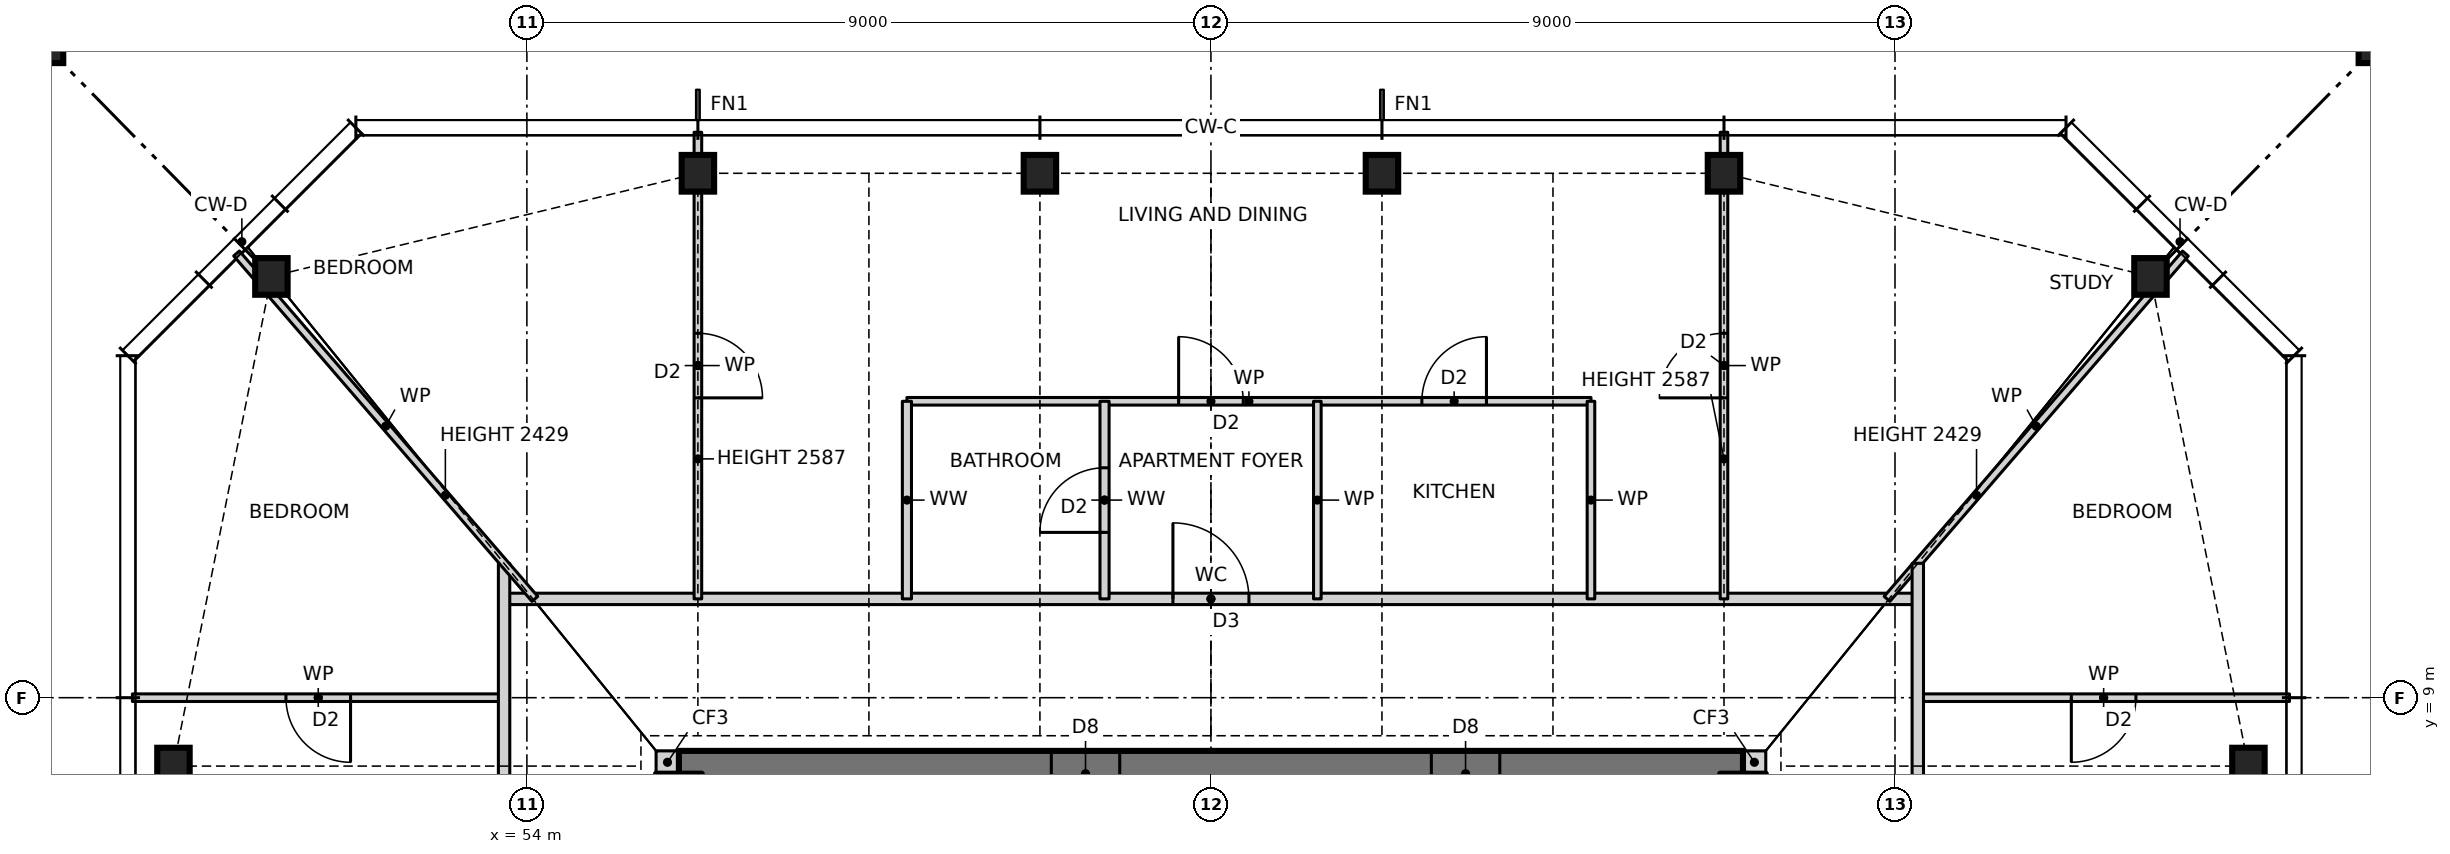
"""IFC4 building model, lengths in metres.
Left out: names, types, materials, properties, quantities, classifications, styles, units other than length and angle.
Written with IfcOpenShell. Run it as: python <this file> out.ifc"""

import sys

from ifc_helpers import new_model, si_unit, direction, frame, frame_2d, origin, origin_2d, place, context, subcontext, project, spatial, rectangle, hollow_rectangle, i_section, extrude, element, fill, save


model = new_model("IFC4")
c1 = context("Model", 3, precision=1e-05, world=origin(), true_north=direction((0.0, 1.0)))
c2 = subcontext(c1, "Body", "Model", "MODEL_VIEW")
j1 = project(units=[si_unit("LENGTHUNIT", "METRE"), si_unit("PLANEANGLEUNIT", "RADIAN")], contexts=[c1])
p1 = place(None, origin())
s1 = spatial("IfcSite", under=j1, at=p1, CompositionType="ELEMENT")
p2 = place(p1, origin())
s2 = spatial("IfcBuilding", under=s1, at=p2, CompositionType="ELEMENT")
p3 = place(p2, frame((0.0, 0.0, 115.5)))
s3 = spatial("IfcBuildingStorey", under=s2, at=p3, CompositionType="ELEMENT", Elevation=115.5)
for number, where, z_axis, x_axis in (
    (1, (76.65, 8.1, 0.0), (0.0, 0.0, 1.0), (1.0, 0.0, 0.0)),
    (2, (75.361, 14.543, 0.0), (0.0, 0.0, 1.0), (1.0, 0.0, 0.0)),
    (3, (69.75, 15.9, 0.0), (0.0, 0.0, 1.0), (1.0, 0.0, 0.0)),
    (4, (65.25, 15.9, 0.0), (0.0, 0.0, 1.0), (1.0, 0.0, 0.0)),
    (5, (60.75, 15.9, 0.0), (0.0, 0.0, 1.0), (1.0, 0.0, 0.0)),
    (6, (56.25, 15.9, 0.0), (0.0, 0.0, 1.0), (1.0, 0.0, 0.0)),
    (7, (50.639, 14.543, 0.0), (0.0, 0.0, 1.0), (1.0, 0.0, 0.0)),
    (8, (49.35, 8.1, 0.0), (0.0, 0.0, 1.0), (1.0, 0.0, 0.0)),
):
    element("IfcColumn", number, at=place(p3, frame(where, z_axis=z_axis, x_axis=x_axis)), inside=s3, PredefinedType="COLUMN", context=c2, shape_type="SweptSolid", body=[
        extrude(i_section(OverallWidth=0.427, OverallDepth=0.483, WebThickness=0.051, FlangeThickness=0.082, at=origin_2d()), origin(), (0.0, 0.0, 1.0), 3.5),
    ])
for number, where, z_axis, x_axis in (
    (9, (78.65, 17.9, 0.0), (0.0, 0.0, 1.0), (1.0, 0.0, 0.0)),
    (10, (47.35, 17.9, 0.0), (0.0, 0.0, 1.0), (1.0, 0.0, 0.0)),
):
    element("IfcColumn", number, at=place(p3, frame(where, z_axis=z_axis, x_axis=x_axis)), inside=s3, PredefinedType="COLUMN", context=c2, shape_type="SweptSolid", body=[
        extrude(hollow_rectangle(XDim=1.1, YDim=1.1, WallThickness=0.06, at=origin_2d()), origin(), (0.0, 0.0, 1.0), 3.5),
    ])
for number, where, z_axis, x_axis in (
    (11, (70.0, 8.15, 0.0), (0.0, 0.0, 1.0), (1.0, 0.0, 0.0)),
    (12, (55.7, 8.15, 0.0), (0.0, 0.0, 1.0), (1.0, 0.0, 0.0)),
):
    element("IfcWall", number, at=place(p3, frame(where, z_axis=z_axis, x_axis=x_axis)), inside=s3, PredefinedType="SOLIDWALL", context=c2, shape_type="SweptSolid", body=[
        extrude(rectangle(XDim=0.3, YDim=0.3, at=frame_2d((0.15, 0.0))), origin(), (0.0, 0.0, 1.0), 3.5),
    ])
p4 = place(p3, frame((70.0, 8.0, 0.0), z_axis=(0.0, 0.0, 1.0), x_axis=(-1.0, 0.0, 0.0)))
e13 = element("IfcWall", 13, at=p4, inside=s3, PredefinedType="SHEAR", context=c2, shape_type="SweptSolid", body=[
    extrude(rectangle(XDim=14.0, YDim=0.6, at=frame_2d((7.0, 0.0))), origin(), (0.0, 0.0, 1.0), 3.5),
])
p5 = place(p4, frame((8.2, 0.0, 0.0)))
e14 = element("IfcOpeningElement", 14, at=p5, cuts=e13, PredefinedType="OPENING", context=c2, shape_type="SweptSolid", body=[
    extrude(rectangle(XDim=0.9, YDim=2.1, at=frame_2d((0.45, 1.05))), frame((0.0, 0.31, 0.0), z_axis=(0.0, -1.0, 0.0), x_axis=(1.0, 0.0, 0.0)), (0.0, 0.0, 1.0), 0.62),
])
p6 = place(p4, frame((3.2, 0.0, 0.0)))
e15 = element("IfcOpeningElement", 15, at=p6, cuts=e13, PredefinedType="OPENING", context=c2, shape_type="SweptSolid", body=[
    extrude(rectangle(XDim=0.9, YDim=2.1, at=frame_2d((0.45, 1.05))), frame((0.0, 0.31, 0.0), z_axis=(0.0, -1.0, 0.0), x_axis=(1.0, 0.0, 0.0)), (0.0, 0.0, 1.0), 0.62),
])
p7 = place(p3, frame((48.81, 9.0, 0.0), z_axis=(0.0, 0.0, 1.0), x_axis=(1.0, 0.0, 0.0)))
e16 = element("IfcWall", 16, at=p7, inside=s3, PredefinedType="PARTITIONING", context=c2, shape_type="SweptSolid", body=[
    extrude(rectangle(XDim=4.89, YDim=0.1, at=frame_2d((2.445, 0.0))), origin(), (0.0, 0.0, 1.0), 3.27),
])
p8 = place(p7, frame((2.02, 0.0, 0.0)))
e17 = element("IfcOpeningElement", 17, at=p8, cuts=e16, PredefinedType="OPENING", context=c2, shape_type="SweptSolid", body=[
    extrude(rectangle(XDim=0.85, YDim=2.1, at=frame_2d((0.425, 1.05))), frame((0.0, 0.06, 0.0), z_axis=(0.0, -1.0, 0.0), x_axis=(1.0, 0.0, 0.0)), (0.0, 0.0, 1.0), 0.12),
])
p9 = place(p3, frame((72.3, 9.0, 0.0), z_axis=(0.0, 0.0, 1.0), x_axis=(1.0, 0.0, 0.0)))
e18 = element("IfcWall", 18, at=p9, inside=s3, PredefinedType="PARTITIONING", context=c2, shape_type="SweptSolid", body=[
    extrude(rectangle(XDim=4.89, YDim=0.1, at=frame_2d((2.445, 0.0))), origin(), (0.0, 0.0, 1.0), 3.27),
])
p10 = place(p9, frame((2.02, 0.0, 0.0)))
e19 = element("IfcOpeningElement", 19, at=p10, cuts=e18, PredefinedType="OPENING", context=c2, shape_type="SweptSolid", body=[
    extrude(rectangle(XDim=0.85, YDim=2.1, at=frame_2d((0.425, 1.05))), frame((0.0, 0.06, 0.0), z_axis=(0.0, -1.0, 0.0), x_axis=(1.0, 0.0, 0.0)), (0.0, 0.0, 1.0), 0.12),
])
p11 = place(p3, frame((53.7, 10.3, 0.0), z_axis=(0.0, 0.0, 1.0), x_axis=(1.0, 0.0, 0.0)))
e20 = element("IfcWall", 20, at=p11, inside=s3, PredefinedType="PARTITIONING", context=c2, shape_type="SweptSolid", body=[
    extrude(rectangle(XDim=18.6, YDim=0.15, at=frame_2d((9.3, 0.0))), origin(), (0.0, 0.0, 1.0), 3.27),
])
p12 = place(p11, frame((8.8, 0.0, 0.0)))
e21 = element("IfcOpeningElement", 21, at=p12, cuts=e20, PredefinedType="OPENING", context=c2, shape_type="SweptSolid", body=[
    extrude(rectangle(XDim=1.0, YDim=2.1, at=frame_2d((0.5, 1.05))), frame((0.0, 0.085, 0.0), z_axis=(0.0, -1.0, 0.0), x_axis=(1.0, 0.0, 0.0)), (0.0, 0.0, 1.0), 0.17),
])
p13 = place(p3, frame((59.0, 12.9, 0.0), z_axis=(0.0, 0.0, 1.0), x_axis=(1.0, 0.0, 0.0)))
e22 = element("IfcWall", 22, at=p13, inside=s3, PredefinedType="PARTITIONING", context=c2, shape_type="SweptSolid", body=[
    extrude(rectangle(XDim=9.0, YDim=0.1, at=frame_2d((4.5, 0.0))), origin(), (0.0, 0.0, 1.0), 3.27),
])
p14 = place(p13, frame((6.775, 0.0, 0.0)))
e23 = element("IfcOpeningElement", 23, at=p14, cuts=e22, PredefinedType="OPENING", context=c2, shape_type="SweptSolid", body=[
    extrude(rectangle(XDim=0.85, YDim=2.1, at=frame_2d((0.425, 1.05))), frame((0.0, 0.06, 0.0), z_axis=(0.0, -1.0, 0.0), x_axis=(1.0, 0.0, 0.0)), (0.0, 0.0, 1.0), 0.12),
])
p15 = place(p13, frame((3.575, 0.0, 0.0)))
e24 = element("IfcOpeningElement", 24, at=p15, cuts=e22, PredefinedType="OPENING", context=c2, shape_type="SweptSolid", body=[
    extrude(rectangle(XDim=0.85, YDim=2.1, at=frame_2d((0.425, 1.05))), frame((0.0, 0.06, 0.0), z_axis=(0.0, -1.0, 0.0), x_axis=(1.0, 0.0, 0.0)), (0.0, 0.0, 1.0), 0.12),
])
p16 = place(p3, frame((71.895, 10.3, 0.0), z_axis=(0.0, 0.0, 1.0), x_axis=(0.65378286253, 0.756682211144, 0.0)))
e25 = element("IfcWall", 25, at=p16, inside=s3, PredefinedType="PARTITIONING", context=c2, shape_type="SweptSolid", body=[
    extrude(rectangle(XDim=6.005, YDim=0.1, at=frame_2d((3.002, 0.0))), origin(), (0.0, 0.0, 1.0), 2.429),
])
p17 = place(p3, frame((72.3, -10.768, 0.0), z_axis=(0.0, 0.0, 1.0), x_axis=(0.0, 1.0, 0.0)))
e26 = element("IfcWall", 26, at=p17, inside=s3, PredefinedType="PARTITIONING", context=c2, shape_type="SweptSolid", body=[
    extrude(rectangle(XDim=21.536, YDim=0.15, at=frame_2d((10.768, 0.0))), origin(), (0.0, 0.0, 1.0), 3.27),
])
p18 = place(p17, frame((10.268, 0.0, 0.0)))
e27 = element("IfcOpeningElement", 27, at=p18, cuts=e26, PredefinedType="OPENING", context=c2, shape_type="SweptSolid", body=[
    extrude(rectangle(XDim=1.0, YDim=2.1, at=frame_2d((0.5, 1.05))), frame((0.0, 0.085, 0.0), z_axis=(0.0, -1.0, 0.0), x_axis=(1.0, 0.0, 0.0)), (0.0, 0.0, 1.0), 0.17),
])
p19 = place(p3, frame((69.75, 10.3, 0.0), z_axis=(0.0, 0.0, 1.0), x_axis=(0.0, 1.0, 0.0)))
e28 = element("IfcWall", 28, at=p19, inside=s3, PredefinedType="PARTITIONING", context=c2, shape_type="SweptSolid", body=[
    extrude(rectangle(XDim=6.14, YDim=0.1, at=frame_2d((3.07, 0.0))), origin(), (0.0, 0.0, 1.0), 2.587),
])
p20 = place(p19, frame((2.645, 0.0, 0.0)))
e29 = element("IfcOpeningElement", 29, at=p20, cuts=e28, PredefinedType="OPENING", context=c2, shape_type="SweptSolid", body=[
    extrude(rectangle(XDim=0.85, YDim=2.1, at=frame_2d((0.425, 1.05))), frame((0.0, 0.06, 0.0), z_axis=(0.0, -1.0, 0.0), x_axis=(1.0, 0.0, 0.0)), (0.0, 0.0, 1.0), 0.12),
])
for number, where, z_axis, x_axis in (
    (30, (68.0, 10.3, 0.0), (0.0, 0.0, 1.0), (0.0, 1.0, 0.0)),
    (31, (64.4, 10.3, 0.0), (0.0, 0.0, 1.0), (0.0, 1.0, 0.0)),
):
    element("IfcWall", number, at=place(p3, frame(where, z_axis=z_axis, x_axis=x_axis)), inside=s3, PredefinedType="PARTITIONING", context=c2, shape_type="SweptSolid", body=[
        extrude(rectangle(XDim=2.6, YDim=0.1, at=frame_2d((1.3, 0.0))), origin(), (0.0, 0.0, 1.0), 3.27),
    ])
p21 = place(p3, frame((61.6, 10.3, 0.0), z_axis=(0.0, 0.0, 1.0), x_axis=(0.0, 1.0, 0.0)))
e32 = element("IfcWall", 32, at=p21, inside=s3, PredefinedType="PARTITIONING", context=c2, shape_type="SweptSolid", body=[
    extrude(rectangle(XDim=2.6, YDim=0.12, at=frame_2d((1.3, 0.0))), origin(), (0.0, 0.0, 1.0), 3.27),
])
p22 = place(p21, frame((0.875, 0.0, 0.0)))
e33 = element("IfcOpeningElement", 33, at=p22, cuts=e32, PredefinedType="OPENING", context=c2, shape_type="SweptSolid", body=[
    extrude(rectangle(XDim=0.85, YDim=2.1, at=frame_2d((0.425, 1.05))), frame((0.0, 0.07, 0.0), z_axis=(0.0, -1.0, 0.0), x_axis=(1.0, 0.0, 0.0)), (0.0, 0.0, 1.0), 0.14),
])
p23 = place(p3, frame((59.0, 10.3, 0.0), z_axis=(0.0, 0.0, 1.0), x_axis=(0.0, 1.0, 0.0)))
e34 = element("IfcWall", 34, at=p23, inside=s3, PredefinedType="PARTITIONING", context=c2, shape_type="SweptSolid", body=[
    extrude(rectangle(XDim=2.6, YDim=0.12, at=frame_2d((1.3, 0.0))), origin(), (0.0, 0.0, 1.0), 3.27),
])
p24 = place(p3, frame((56.25, 10.3, 0.0), z_axis=(0.0, 0.0, 1.0), x_axis=(0.0, 1.0, 0.0)))
e35 = element("IfcWall", 35, at=p24, inside=s3, PredefinedType="PARTITIONING", context=c2, shape_type="SweptSolid", body=[
    extrude(rectangle(XDim=6.14, YDim=0.1, at=frame_2d((3.07, 0.0))), origin(), (0.0, 0.0, 1.0), 2.587),
])
p25 = place(p24, frame((2.645, 0.0, 0.0)))
e36 = element("IfcOpeningElement", 36, at=p25, cuts=e35, PredefinedType="OPENING", context=c2, shape_type="SweptSolid", body=[
    extrude(rectangle(XDim=0.85, YDim=2.1, at=frame_2d((0.425, 1.05))), frame((0.0, 0.06, 0.0), z_axis=(0.0, -1.0, 0.0), x_axis=(1.0, 0.0, 0.0)), (0.0, 0.0, 1.0), 0.12),
])
p26 = place(p3, frame((53.7, -10.768, 0.0), z_axis=(0.0, 0.0, 1.0), x_axis=(0.0, 1.0, 0.0)))
e37 = element("IfcWall", 37, at=p26, inside=s3, PredefinedType="PARTITIONING", context=c2, shape_type="SweptSolid", body=[
    extrude(rectangle(XDim=21.536, YDim=0.15, at=frame_2d((10.768, 0.0))), origin(), (0.0, 0.0, 1.0), 3.27),
])
p27 = place(p26, frame((10.268, 0.0, 0.0)))
e38 = element("IfcOpeningElement", 38, at=p27, cuts=e37, PredefinedType="OPENING", context=c2, shape_type="SweptSolid", body=[
    extrude(rectangle(XDim=1.0, YDim=2.1, at=frame_2d((0.5, 1.05))), frame((0.0, 0.085, 0.0), z_axis=(0.0, -1.0, 0.0), x_axis=(1.0, 0.0, 0.0)), (0.0, 0.0, 1.0), 0.17),
])
p28 = place(p3, frame((54.105, 10.3, 0.0), z_axis=(0.0, 0.0, 1.0), x_axis=(-0.653606109319, 0.756834892074, 0.0)))
e39 = element("IfcWall", 39, at=p28, inside=s3, PredefinedType="PARTITIONING", context=c2, shape_type="SweptSolid", body=[
    extrude(rectangle(XDim=6.005, YDim=0.1, at=frame_2d((3.002, 0.0))), origin(), (0.0, 0.0, 1.0), 2.429),
])
p29 = place(p10, frame((0.85, 0.0, 0.0), z_axis=(0.0, 0.0, 1.0), x_axis=(-1.0, 0.0, 0.0)))
e40 = element("IfcDoor", 40, at=p29, inside=s3, OperationType="SINGLE_SWING_RIGHT", PredefinedType="DOOR", context=c2, shape_type="SweptSolid", body=[
    extrude(rectangle(XDim=0.85, YDim=2.1, at=frame_2d((0.425, 1.05))), frame((0.0, 0.025, 0.0), z_axis=(0.0, -1.0, 0.0), x_axis=(1.0, 0.0, 0.0)), (0.0, 0.0, 1.0), 0.05),
])
fill(e19, e40)
p30 = place(p14, origin())
e41 = element("IfcDoor", 41, at=p30, inside=s3, OperationType="SINGLE_SWING_RIGHT", PredefinedType="DOOR", context=c2, shape_type="SweptSolid", body=[
    extrude(rectangle(XDim=0.85, YDim=2.1, at=frame_2d((0.425, 1.05))), frame((0.0, 0.025, 0.0), z_axis=(0.0, -1.0, 0.0), x_axis=(1.0, 0.0, 0.0)), (0.0, 0.0, 1.0), 0.05),
])
fill(e23, e41)
p31 = place(p12, origin())
e42 = element("IfcDoor", 42, at=p31, inside=s3, OperationType="SINGLE_SWING_LEFT", PredefinedType="DOOR", context=c2, shape_type="SweptSolid", body=[
    extrude(rectangle(XDim=1.0, YDim=2.1, at=frame_2d((0.5, 1.05))), frame((0.0, 0.025, 0.0), z_axis=(0.0, -1.0, 0.0), x_axis=(1.0, 0.0, 0.0)), (0.0, 0.0, 1.0), 0.05),
])
fill(e21, e42)
p32 = place(p15, origin())
e43 = element("IfcDoor", 43, at=p32, inside=s3, OperationType="SINGLE_SWING_LEFT", PredefinedType="DOOR", context=c2, shape_type="SweptSolid", body=[
    extrude(rectangle(XDim=0.85, YDim=2.1, at=frame_2d((0.425, 1.05))), frame((0.0, 0.025, 0.0), z_axis=(0.0, -1.0, 0.0), x_axis=(1.0, 0.0, 0.0)), (0.0, 0.0, 1.0), 0.05),
])
fill(e24, e43)
p33 = place(p22, origin())
e44 = element("IfcDoor", 44, at=p33, inside=s3, OperationType="SINGLE_SWING_LEFT", PredefinedType="DOOR", context=c2, shape_type="SweptSolid", body=[
    extrude(rectangle(XDim=0.85, YDim=2.1, at=frame_2d((0.425, 1.05))), frame((0.0, 0.025, 0.0), z_axis=(0.0, -1.0, 0.0), x_axis=(1.0, 0.0, 0.0)), (0.0, 0.0, 1.0), 0.05),
])
fill(e33, e44)
p34 = place(p20, origin())
e45 = element("IfcDoor", 45, at=p34, inside=s3, OperationType="SINGLE_SWING_LEFT", PredefinedType="DOOR", context=c2, shape_type="SweptSolid", body=[
    extrude(rectangle(XDim=0.85, YDim=2.1, at=frame_2d((0.425, 1.05))), frame((0.0, 0.025, 0.0), z_axis=(0.0, -1.0, 0.0), x_axis=(1.0, 0.0, 0.0)), (0.0, 0.0, 1.0), 0.05),
])
fill(e29, e45)
p35 = place(p25, frame((0.85, 0.0, 0.0), z_axis=(0.0, 0.0, 1.0), x_axis=(-1.0, 0.0, 0.0)))
e46 = element("IfcDoor", 46, at=p35, inside=s3, OperationType="SINGLE_SWING_RIGHT", PredefinedType="DOOR", context=c2, shape_type="SweptSolid", body=[
    extrude(rectangle(XDim=0.85, YDim=2.1, at=frame_2d((0.425, 1.05))), frame((0.0, 0.025, 0.0), z_axis=(0.0, -1.0, 0.0), x_axis=(1.0, 0.0, 0.0)), (0.0, 0.0, 1.0), 0.05),
])
fill(e36, e46)
p36 = place(p8, frame((0.85, 0.0, 0.0), z_axis=(0.0, 0.0, 1.0), x_axis=(-1.0, 0.0, 0.0)))
e47 = element("IfcDoor", 47, at=p36, inside=s3, OperationType="SINGLE_SWING_LEFT", PredefinedType="DOOR", context=c2, shape_type="SweptSolid", body=[
    extrude(rectangle(XDim=0.85, YDim=2.1, at=frame_2d((0.425, 1.05))), frame((0.0, 0.025, 0.0), z_axis=(0.0, -1.0, 0.0), x_axis=(1.0, 0.0, 0.0)), (0.0, 0.0, 1.0), 0.05),
])
fill(e17, e47)
p37 = place(p5, origin())
e48 = element("IfcDoor", 48, at=p37, inside=s3, OperationType="SINGLE_SWING_RIGHT", PredefinedType="DOOR", context=c2, shape_type="SweptSolid", body=[
    extrude(rectangle(XDim=0.9, YDim=2.1, at=frame_2d((0.45, 1.05))), frame((0.0, 0.025, 0.0), z_axis=(0.0, -1.0, 0.0), x_axis=(1.0, 0.0, 0.0)), (0.0, 0.0, 1.0), 0.05),
])
fill(e14, e48)
p38 = place(p6, origin())
e49 = element("IfcDoor", 49, at=p38, inside=s3, OperationType="SINGLE_SWING_RIGHT", PredefinedType="DOOR", context=c2, shape_type="SweptSolid", body=[
    extrude(rectangle(XDim=0.9, YDim=2.1, at=frame_2d((0.45, 1.05))), frame((0.0, 0.025, 0.0), z_axis=(0.0, -1.0, 0.0), x_axis=(1.0, 0.0, 0.0)), (0.0, 0.0, 1.0), 0.05),
])
fill(e15, e49)
save(model, sys.argv[1])
